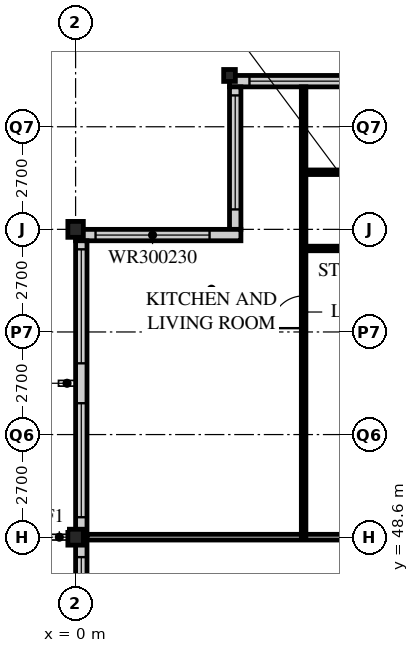
"""IFC4 building model, lengths in metres.
Left out: names, types, materials, properties, quantities, classifications, styles, units other than length and angle.
Written with IfcOpenShell. Run it as: python <this file> out.ifc"""

import sys

from ifc_helpers import new_model, si_unit, direction, frame, frame_2d, origin, origin_2d, place, context, subcontext, project, spatial, rectangle, i_section, extrude, element, fill, save


model = new_model("IFC4")
c1 = context("Model", 3, precision=1e-05, world=origin(), true_north=direction((0.0, 1.0)))
c2 = subcontext(c1, "Body", "Model", "MODEL_VIEW")
j1 = project(units=[si_unit("LENGTHUNIT", "METRE"), si_unit("PLANEANGLEUNIT", "RADIAN")], contexts=[c1])
p1 = place(None, origin())
s1 = spatial("IfcSite", under=j1, at=p1, CompositionType="ELEMENT")
p2 = place(p1, origin())
s2 = spatial("IfcBuilding", under=s1, at=p2, CompositionType="ELEMENT")
p3 = place(p2, frame((0.0, 0.0, 289.2)))
s3 = spatial("IfcBuildingStorey", under=s2, at=p3, CompositionType="ELEMENT", Elevation=289.2)
for number, where, z_axis, x_axis in (
    (1, (0.0, 48.6, 0.0), (0.0, 0.0, 1.0), (1.0, 0.0, 0.0)),
    (2, (0.0, 56.7, 0.0), (0.0, 0.0, 1.0), (1.0, 0.0, 0.0)),
):
    element("IfcColumn", number, at=place(p3, frame(where, z_axis=z_axis, x_axis=x_axis)), inside=s3, PredefinedType="COLUMN", context=c2, shape_type="SweptSolid", body=[
        extrude(i_section(OverallWidth=0.407, OverallDepth=0.419, WebThickness=0.031, FlangeThickness=0.049, FilletRadius=0.015, at=origin_2d()), origin(), (0.0, 0.0, 1.0), 3.9),
    ])
p4 = place(p3, frame((4.05, 60.75, 0.0), z_axis=(0.0, 0.0, 1.0), x_axis=(1.0, 0.0, 0.0)))
e3 = element("IfcColumn", 3, at=p4, inside=s3, PredefinedType="COLUMN", context=c2, shape_type="SweptSolid", body=[
    extrude(i_section(OverallWidth=0.307, OverallDepth=0.314, WebThickness=0.012, FlangeThickness=0.019, FilletRadius=0.015, at=origin_2d()), origin(), (0.0, 0.0, 1.0), 3.9),
])
p5 = place(p3, frame((8.4, 60.6, 0.0), z_axis=(0.0, 0.0, 1.0), x_axis=(-1.0, 0.0, 0.0)))
e4 = element("IfcWall", 4, at=p5, inside=s3, PredefinedType="SOLIDWALL", context=c2, shape_type="SweptSolid", body=[
    extrude(rectangle(XDim=4.35, YDim=0.3, at=frame_2d((2.175, 0.0))), origin(), (0.0, 0.0, 1.0), 3.69),
])
p6 = place(p5, frame((0.825, 0.0, 0.6)))
e5 = element("IfcOpeningElement", 5, at=p6, cuts=e4, PredefinedType="OPENING", context=c2, shape_type="SweptSolid", body=[
    extrude(rectangle(XDim=3.0, YDim=2.3, at=frame_2d((1.5, 1.15))), frame((0.0, 0.16, 0.0), z_axis=(0.0, -1.0, 0.0), x_axis=(1.0, 0.0, 0.0)), (0.0, 0.0, 1.0), 0.32),
])
p7 = place(p3, frame((4.2, 60.45, 0.0), z_axis=(0.0, 0.0, 1.0), x_axis=(0.0, -1.0, 0.0)))
e6 = element("IfcWall", 6, at=p7, inside=s3, PredefinedType="SOLIDWALL", context=c2, shape_type="SweptSolid", body=[
    extrude(rectangle(XDim=3.75, YDim=0.3, at=frame_2d((1.875, 0.0))), origin(), (0.0, 0.0, 1.0), 3.69),
])
p8 = place(p7, frame((0.225, 0.0, 0.6)))
e7 = element("IfcOpeningElement", 7, at=p8, cuts=e6, PredefinedType="OPENING", context=c2, shape_type="SweptSolid", body=[
    extrude(rectangle(XDim=3.0, YDim=2.3, at=frame_2d((1.5, 1.15))), frame((0.0, 0.16, 0.0), z_axis=(0.0, -1.0, 0.0), x_axis=(1.0, 0.0, 0.0)), (0.0, 0.0, 1.0), 0.32),
])
p9 = place(p3, frame((4.35, 56.55, 0.0), z_axis=(0.0, 0.0, 1.0), x_axis=(-1.0, 0.0, 0.0)))
e8 = element("IfcWall", 8, at=p9, inside=s3, PredefinedType="SOLIDWALL", context=c2, shape_type="SweptSolid", body=[
    extrude(rectangle(XDim=4.35, YDim=0.3, at=frame_2d((2.175, 0.0))), origin(), (0.0, 0.0, 1.0), 3.69),
])
p10 = place(p9, frame((0.825, 0.0, 0.6)))
e9 = element("IfcOpeningElement", 9, at=p10, cuts=e8, PredefinedType="OPENING", context=c2, shape_type="SweptSolid", body=[
    extrude(rectangle(XDim=3.0, YDim=2.3, at=frame_2d((1.5, 1.15))), frame((0.0, 0.16, 0.0), z_axis=(0.0, -1.0, 0.0), x_axis=(1.0, 0.0, 0.0)), (0.0, 0.0, 1.0), 0.32),
])
p11 = place(p3, frame((0.15, 56.4, 0.0), z_axis=(0.0, 0.0, 1.0), x_axis=(0.0, -1.0, 0.0)))
e10 = element("IfcWall", 10, at=p11, inside=s3, PredefinedType="SOLIDWALL", context=c2, shape_type="SweptSolid", body=[
    extrude(rectangle(XDim=32.1, YDim=0.3, at=frame_2d((16.05, 0.0))), origin(), (0.0, 0.0, 1.0), 3.69),
])
p12 = place(p11, frame((0.225, 0.0, 0.6)))
e11 = element("IfcOpeningElement", 11, at=p12, cuts=e10, PredefinedType="OPENING", context=c2, shape_type="SweptSolid", body=[
    extrude(rectangle(XDim=3.0, YDim=2.4, at=frame_2d((1.5, 1.2))), frame((0.0, 0.16, 0.0), z_axis=(0.0, -1.0, 0.0), x_axis=(1.0, 0.0, 0.0)), (0.0, 0.0, 1.0), 0.32),
])
p13 = place(p11, frame((4.275, 0.0, 0.6)))
e12 = element("IfcOpeningElement", 12, at=p13, cuts=e10, PredefinedType="OPENING", context=c2, shape_type="SweptSolid", body=[
    extrude(rectangle(XDim=3.0, YDim=2.4, at=frame_2d((1.5, 1.2))), frame((0.0, 0.16, 0.0), z_axis=(0.0, -1.0, 0.0), x_axis=(1.0, 0.0, 0.0)), (0.0, 0.0, 1.0), 0.32),
])
p14 = place(p11, frame((8.325, 0.0, 0.6)))
e13 = element("IfcOpeningElement", 13, at=p14, cuts=e10, PredefinedType="OPENING", context=c2, shape_type="SweptSolid", body=[
    extrude(rectangle(XDim=3.0, YDim=2.4, at=frame_2d((1.5, 1.2))), frame((0.0, 0.16, 0.0), z_axis=(0.0, -1.0, 0.0), x_axis=(1.0, 0.0, 0.0)), (0.0, 0.0, 1.0), 0.32),
])
p15 = place(p11, frame((12.375, 0.0, 0.6)))
e14 = element("IfcOpeningElement", 14, at=p15, cuts=e10, PredefinedType="OPENING", context=c2, shape_type="SweptSolid", body=[
    extrude(rectangle(XDim=3.0, YDim=2.4, at=frame_2d((1.5, 1.2))), frame((0.0, 0.16, 0.0), z_axis=(0.0, -1.0, 0.0), x_axis=(1.0, 0.0, 0.0)), (0.0, 0.0, 1.0), 0.32),
])
p16 = place(p11, frame((16.425, 0.0, 0.6)))
e15 = element("IfcOpeningElement", 15, at=p16, cuts=e10, PredefinedType="OPENING", context=c2, shape_type="SweptSolid", body=[
    extrude(rectangle(XDim=3.0, YDim=2.4, at=frame_2d((1.5, 1.2))), frame((0.0, 0.16, 0.0), z_axis=(0.0, -1.0, 0.0), x_axis=(1.0, 0.0, 0.0)), (0.0, 0.0, 1.0), 0.32),
])
p17 = place(p11, frame((20.475, 0.0, 0.6)))
e16 = element("IfcOpeningElement", 16, at=p17, cuts=e10, PredefinedType="OPENING", context=c2, shape_type="SweptSolid", body=[
    extrude(rectangle(XDim=3.0, YDim=2.4, at=frame_2d((1.5, 1.2))), frame((0.0, 0.16, 0.0), z_axis=(0.0, -1.0, 0.0), x_axis=(1.0, 0.0, 0.0)), (0.0, 0.0, 1.0), 0.32),
])
p18 = place(p11, frame((24.525, 0.0, 0.6)))
e17 = element("IfcOpeningElement", 17, at=p18, cuts=e10, PredefinedType="OPENING", context=c2, shape_type="SweptSolid", body=[
    extrude(rectangle(XDim=3.0, YDim=2.4, at=frame_2d((1.5, 1.2))), frame((0.0, 0.16, 0.0), z_axis=(0.0, -1.0, 0.0), x_axis=(1.0, 0.0, 0.0)), (0.0, 0.0, 1.0), 0.32),
])
p19 = place(p11, frame((28.575, 0.0, 0.6)))
e18 = element("IfcOpeningElement", 18, at=p19, cuts=e10, PredefinedType="OPENING", context=c2, shape_type="SweptSolid", body=[
    extrude(rectangle(XDim=3.0, YDim=2.4, at=frame_2d((1.5, 1.2))), frame((0.0, 0.16, 0.0), z_axis=(0.0, -1.0, 0.0), x_axis=(1.0, 0.0, 0.0)), (0.0, 0.0, 1.0), 0.32),
])
p20 = place(p3, frame((0.3, 48.6, 0.0), z_axis=(0.0, 0.0, 1.0), x_axis=(1.0, 0.0, 0.0)))
e19 = element("IfcWall", 19, at=p20, inside=s3, PredefinedType="PARTITIONING", context=c2, shape_type="SweptSolid", body=[
    extrude(rectangle(XDim=11.85, YDim=0.15, at=frame_2d((5.925, 0.0))), origin(), (0.0, 0.0, 1.0), 3.078),
])
p21 = place(p3, frame((6.0, 48.6, 0.0), z_axis=(0.0, 0.0, 1.0), x_axis=(0.0, 1.0, 0.0)))
e20 = element("IfcWall", 20, at=p21, inside=s3, PredefinedType="PARTITIONING", context=c2, shape_type="SweptSolid", body=[
    extrude(rectangle(XDim=11.85, YDim=0.12, at=frame_2d((5.925, 0.0))), origin(), (0.0, 0.0, 1.0), 3.69),
])
p22 = place(p21, frame((5.5, 0.0, 0.0)))
e21 = element("IfcOpeningElement", 21, at=p22, cuts=e20, PredefinedType="OPENING", context=c2, shape_type="SweptSolid", body=[
    extrude(rectangle(XDim=0.85, YDim=2.1, at=frame_2d((0.425, 1.05))), frame((0.0, 0.07, 0.0), z_axis=(0.0, -1.0, 0.0), x_axis=(1.0, 0.0, 0.0)), (0.0, 0.0, 1.0), 0.14),
])
for number, where, z_axis, x_axis in (
    (22, (6.0, 56.197, 0.0), (0.0, 0.0, 1.0), (1.0, 0.0, 0.0)),
    (23, (6.0, 58.203, 0.0), (0.0, 0.0, 1.0), (1.0, 0.0, 0.0)),
):
    element("IfcWall", number, at=place(p3, frame(where, z_axis=z_axis, x_axis=x_axis)), inside=s3, PredefinedType="PARTITIONING", context=c2, shape_type="SweptSolid", body=[
        extrude(rectangle(XDim=2.363, YDim=0.12, at=frame_2d((1.182, 0.0))), origin(), (0.0, 0.0, 1.0), 3.69),
    ])
p23 = place(p6, origin())
e24 = element("IfcWindow", 24, at=p23, inside=s3, PartitioningType="SINGLE_PANEL", PredefinedType="WINDOW", context=c2, shape_type="SweptSolid", body=[
    extrude(rectangle(XDim=3.0, YDim=2.3, at=frame_2d((1.5, 1.15))), frame((0.0, 0.03, 0.0), z_axis=(0.0, -1.0, 0.0), x_axis=(1.0, 0.0, 0.0)), (0.0, 0.0, 1.0), 0.06),
])
fill(e5, e24)
p24 = place(p8, origin())
e25 = element("IfcWindow", 25, at=p24, inside=s3, PartitioningType="SINGLE_PANEL", PredefinedType="WINDOW", context=c2, shape_type="SweptSolid", body=[
    extrude(rectangle(XDim=3.0, YDim=2.3, at=frame_2d((1.5, 1.15))), frame((0.0, 0.03, 0.0), z_axis=(0.0, -1.0, 0.0), x_axis=(1.0, 0.0, 0.0)), (0.0, 0.0, 1.0), 0.06),
])
fill(e7, e25)
p25 = place(p10, origin())
e26 = element("IfcWindow", 26, at=p25, inside=s3, PartitioningType="SINGLE_PANEL", PredefinedType="WINDOW", context=c2, shape_type="SweptSolid", body=[
    extrude(rectangle(XDim=3.0, YDim=2.3, at=frame_2d((1.5, 1.15))), frame((0.0, 0.03, 0.0), z_axis=(0.0, -1.0, 0.0), x_axis=(1.0, 0.0, 0.0)), (0.0, 0.0, 1.0), 0.06),
])
fill(e9, e26)
p26 = place(p12, origin())
e27 = element("IfcWindow", 27, at=p26, inside=s3, PartitioningType="SINGLE_PANEL", PredefinedType="WINDOW", context=c2, shape_type="SweptSolid", body=[
    extrude(rectangle(XDim=3.0, YDim=2.4, at=frame_2d((1.5, 1.2))), frame((0.0, 0.03, 0.0), z_axis=(0.0, -1.0, 0.0), x_axis=(1.0, 0.0, 0.0)), (0.0, 0.0, 1.0), 0.06),
])
fill(e11, e27)
p27 = place(p13, origin())
e28 = element("IfcWindow", 28, at=p27, inside=s3, PartitioningType="SINGLE_PANEL", PredefinedType="WINDOW", context=c2, shape_type="SweptSolid", body=[
    extrude(rectangle(XDim=3.0, YDim=2.4, at=frame_2d((1.5, 1.2))), frame((0.0, 0.03, 0.0), z_axis=(0.0, -1.0, 0.0), x_axis=(1.0, 0.0, 0.0)), (0.0, 0.0, 1.0), 0.06),
])
fill(e12, e28)
p28 = place(p14, origin())
e29 = element("IfcWindow", 29, at=p28, inside=s3, PartitioningType="SINGLE_PANEL", PredefinedType="WINDOW", context=c2, shape_type="SweptSolid", body=[
    extrude(rectangle(XDim=3.0, YDim=2.4, at=frame_2d((1.5, 1.2))), frame((0.0, 0.03, 0.0), z_axis=(0.0, -1.0, 0.0), x_axis=(1.0, 0.0, 0.0)), (0.0, 0.0, 1.0), 0.06),
])
fill(e13, e29)
p29 = place(p22, origin())
e30 = element("IfcDoor", 30, at=p29, inside=s3, OperationType="SINGLE_SWING_LEFT", PredefinedType="DOOR", context=c2, shape_type="SweptSolid", body=[
    extrude(rectangle(XDim=0.85, YDim=2.1, at=frame_2d((0.425, 1.05))), frame((0.0, 0.025, 0.0), z_axis=(0.0, -1.0, 0.0), x_axis=(1.0, 0.0, 0.0)), (0.0, 0.0, 1.0), 0.05),
])
fill(e21, e30)
save(model, sys.argv[1])
